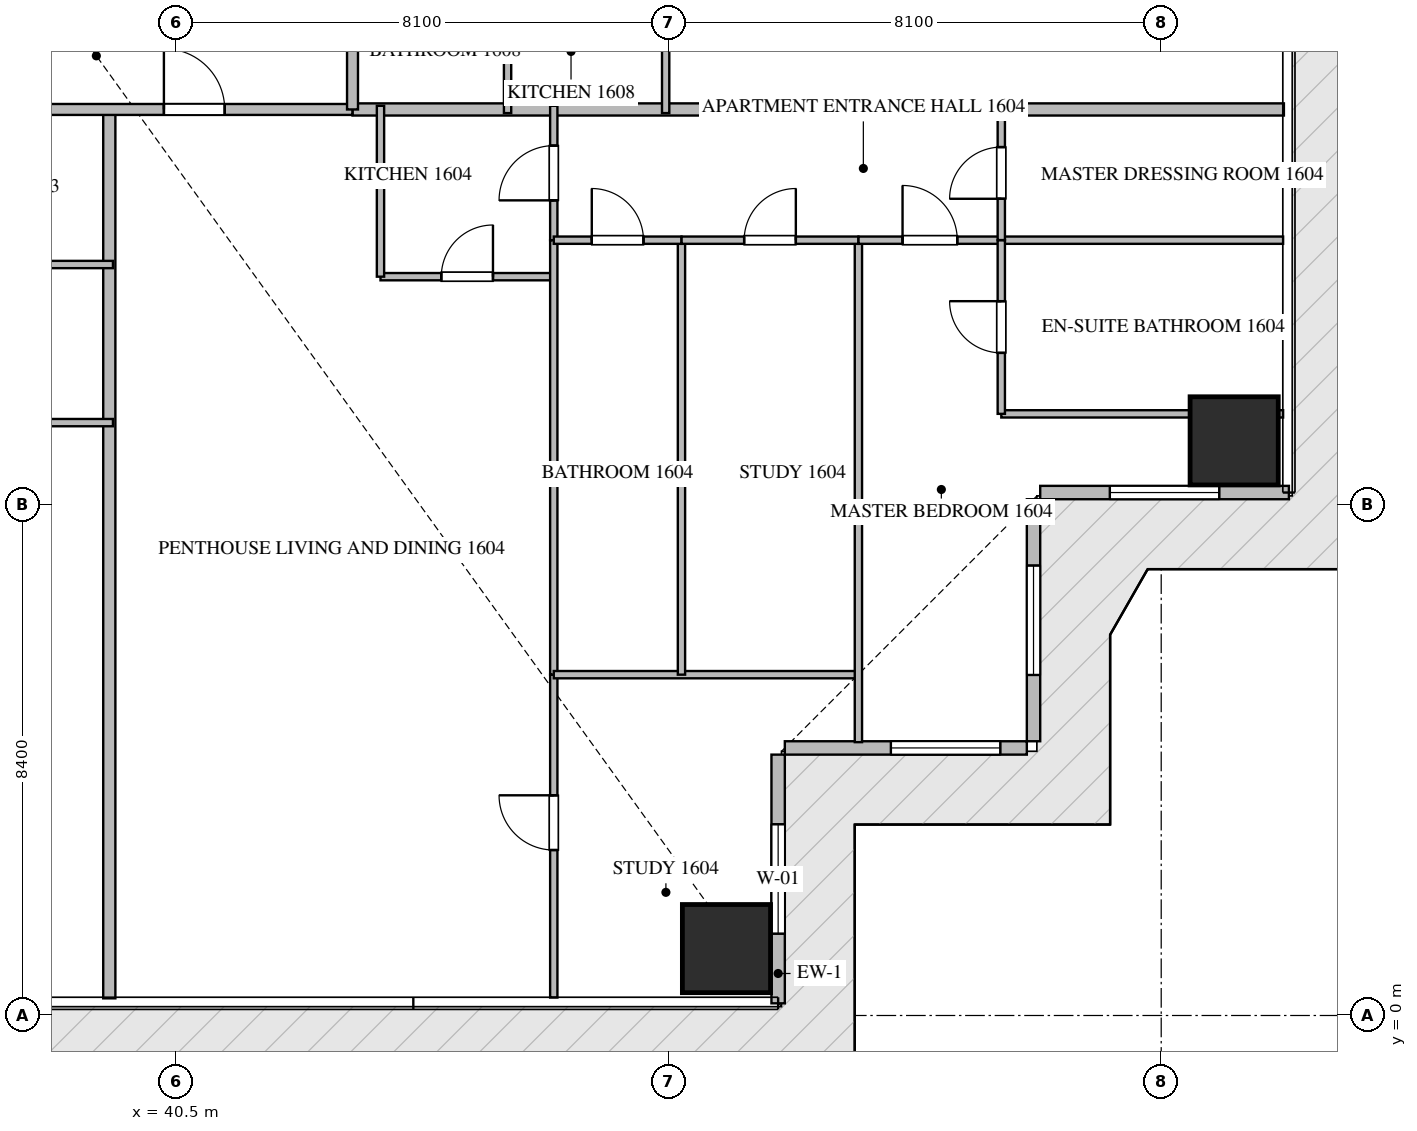
"""IFC4 building model, lengths in metres.
Left out: names, types, materials, properties, quantities, classifications, styles, units other than length and angle.
Written with IfcOpenShell. Run it as: python <this file> out.ifc"""

import sys

from ifc_helpers import new_model, si_unit, direction, frame, frame_2d, origin, origin_2d, place, context, subcontext, project, spatial, rectangle, extrude, source, transform, mapped, element, fill, save


model = new_model("IFC4")
c1 = context("Model", 3, precision=1e-05, world=origin(), true_north=direction((0.0, 1.0)))
c2 = subcontext(c1, "Body", "Model", "MODEL_VIEW")
j1 = project(units=[si_unit("LENGTHUNIT", "METRE"), si_unit("PLANEANGLEUNIT", "RADIAN")], contexts=[c1])
p1 = place(None, origin())
s1 = spatial("IfcSite", under=j1, at=p1, CompositionType="ELEMENT")
p2 = place(p1, origin())
s2 = spatial("IfcBuilding", under=s1, at=p2, CompositionType="ELEMENT")
p3 = place(p2, frame((0.0, 0.0, 67.95)))
s3 = spatial("IfcBuildingStorey", under=s2, at=p3, CompositionType="ELEMENT", Elevation=67.95)
m1 = source(origin(), c2, "Body", "SweptSolid", [
    extrude(rectangle(XDim=1.45, YDim=1.45, at=origin_2d()), origin(), (0.0, 0.0, 1.0), 3.75),
])
for number, where, z_axis, x_axis in (
    (1, (49.55, 1.1, -0.26), (0.0, 0.0, 1.0), (1.0, 0.0, 0.0)),
    (2, (57.9, 9.45, -0.26), (0.0, 0.0, 1.0), (1.0, 0.0, 0.0)),
):
    element("IfcColumn", number, at=place(p3, frame(where, z_axis=z_axis, x_axis=x_axis)), inside=s3, PredefinedType="COLUMN", context=c2, shape_type="MappedRepresentation", body=[
        mapped(m1, transform((0.0, 0.0, 0.0), scale=1.0)),
    ])
p4 = place(p3, frame((50.4, 0.2, 0.0), z_axis=(0.0, 0.0, 1.0), x_axis=(0.0, 1.0, 0.0)))
e3 = element("IfcWall", 3, at=p4, inside=s3, PredefinedType="ELEMENTEDWALL", context=c2, shape_type="SweptSolid", body=[
    extrude(rectangle(XDim=4.09, YDim=0.22, at=frame_2d((2.045, 0.0))), origin(), (0.0, 0.0, 1.0), 3.475),
])
p5 = place(p4, frame((1.145, 0.0, 0.65)))
e4 = element("IfcOpeningElement", 4, at=p5, cuts=e3, PredefinedType="OPENING", context=c2, shape_type="SweptSolid", body=[
    extrude(rectangle(XDim=1.8, YDim=2.1, at=frame_2d((0.9, 1.05))), frame((0.0, 0.12, 0.0), z_axis=(0.0, -1.0, 0.0), x_axis=(1.0, 0.0, 0.0)), (0.0, 0.0, 1.0), 0.24),
])
p6 = place(p3, frame((50.51, 4.4, 0.0), z_axis=(0.0, 0.0, 1.0), x_axis=(1.0, 0.0, 0.0)))
e5 = element("IfcWall", 5, at=p6, inside=s3, PredefinedType="ELEMENTEDWALL", context=c2, shape_type="SweptSolid", body=[
    extrude(rectangle(XDim=3.98, YDim=0.22, at=frame_2d((1.99, 0.0))), origin(), (0.0, 0.0, 1.0), 3.475),
])
p7 = place(p6, frame((1.744, 0.0, 0.65)))
e6 = element("IfcOpeningElement", 6, at=p7, cuts=e5, PredefinedType="OPENING", context=c2, shape_type="SweptSolid", body=[
    extrude(rectangle(XDim=1.8, YDim=2.1, at=frame_2d((0.9, 1.05))), frame((0.0, 0.12, 0.0), z_axis=(0.0, -1.0, 0.0), x_axis=(1.0, 0.0, 0.0)), (0.0, 0.0, 1.0), 0.24),
])
p8 = place(p3, frame((54.6, 4.51, 0.0), z_axis=(0.0, 0.0, 1.0), x_axis=(0.0, 1.0, 0.0)))
e7 = element("IfcWall", 7, at=p8, inside=s3, PredefinedType="ELEMENTEDWALL", context=c2, shape_type="SweptSolid", body=[
    extrude(rectangle(XDim=3.98, YDim=0.22, at=frame_2d((1.99, 0.0))), origin(), (0.0, 0.0, 1.0), 3.475),
])
p9 = place(p8, frame((1.09, 0.0, 0.65)))
e8 = element("IfcOpeningElement", 8, at=p9, cuts=e7, PredefinedType="OPENING", context=c2, shape_type="SweptSolid", body=[
    extrude(rectangle(XDim=1.8, YDim=2.1, at=frame_2d((0.9, 1.05))), frame((0.0, 0.12, 0.0), z_axis=(0.0, -1.0, 0.0), x_axis=(1.0, 0.0, 0.0)), (0.0, 0.0, 1.0), 0.24),
])
p10 = place(p3, frame((54.71, 8.6, 0.0), z_axis=(0.0, 0.0, 1.0), x_axis=(1.0, 0.0, 0.0)))
e9 = element("IfcWall", 9, at=p10, inside=s3, PredefinedType="ELEMENTEDWALL", context=c2, shape_type="SweptSolid", body=[
    extrude(rectangle(XDim=4.09, YDim=0.22, at=frame_2d((2.045, 0.0))), origin(), (0.0, 0.0, 1.0), 3.475),
])
p11 = place(p10, frame((1.145, 0.0, 0.65)))
e10 = element("IfcOpeningElement", 10, at=p11, cuts=e9, PredefinedType="OPENING", context=c2, shape_type="SweptSolid", body=[
    extrude(rectangle(XDim=1.8, YDim=2.1, at=frame_2d((0.9, 1.05))), frame((0.0, 0.12, 0.0), z_axis=(0.0, -1.0, 0.0), x_axis=(1.0, 0.0, 0.0)), (0.0, 0.0, 1.0), 0.24),
])
p12 = place(p3, frame((39.4, 0.282, 0.0), z_axis=(0.0, 0.0, 1.0), x_axis=(0.0, 1.0, 0.0)))
e11 = element("IfcWall", 11, at=p12, inside=s3, PredefinedType="PARTITIONING", context=c2, shape_type="SweptSolid", body=[
    extrude(rectangle(XDim=14.618, YDim=0.2, at=frame_2d((7.309, 0.0))), origin(), (0.0, 0.0, 1.0), 3.49),
])
p13 = place(p3, frame((43.4, 14.9, 0.0), z_axis=(0.0, 0.0, 1.0), x_axis=(1.0, 0.0, 0.0)))
e12 = element("IfcWall", 12, at=p13, inside=s3, PredefinedType="PARTITIONING", context=c2, shape_type="SweptSolid", body=[
    extrude(rectangle(XDim=15.318, YDim=0.2, at=frame_2d((7.659, 0.0))), origin(), (0.0, 0.0, 1.0), 3.49),
])
p14 = place(p3, frame((21.402, 14.9, 0.0), z_axis=(0.0, 0.0, 1.0), x_axis=(1.0, 0.0, 0.0)))
e13 = element("IfcWall", 13, at=p14, inside=s3, PredefinedType="PARTITIONING", context=c2, shape_type="SweptSolid", body=[
    extrude(rectangle(XDim=21.996, YDim=0.18, at=frame_2d((10.998, 0.0))), origin(), (0.0, 0.0, 1.0), 3.49),
])
p15 = place(p14, frame((1.96, 0.0, 0.0)))
e14 = element("IfcOpeningElement", 14, at=p15, cuts=e13, PredefinedType="OPENING", context=c2, shape_type="SweptSolid", body=[
    extrude(rectangle(XDim=1.0, YDim=2.15, at=frame_2d((0.5, 1.075))), frame((0.0, 0.1, 0.0), z_axis=(0.0, -1.0, 0.0), x_axis=(1.0, 0.0, 0.0)), (0.0, 0.0, 1.0), 0.2),
])
p16 = place(p14, frame((5.249, 0.0, 0.0)))
e15 = element("IfcOpeningElement", 15, at=p16, cuts=e13, PredefinedType="OPENING", context=c2, shape_type="SweptSolid", body=[
    extrude(rectangle(XDim=1.0, YDim=2.15, at=frame_2d((0.5, 1.075))), frame((0.0, 0.1, 0.0), z_axis=(0.0, -1.0, 0.0), x_axis=(1.0, 0.0, 0.0)), (0.0, 0.0, 1.0), 0.2),
])
p17 = place(p14, frame((11.653, 0.0, 0.0)))
e16 = element("IfcOpeningElement", 16, at=p17, cuts=e13, PredefinedType="OPENING", context=c2, shape_type="SweptSolid", body=[
    extrude(rectangle(XDim=1.0, YDim=2.15, at=frame_2d((0.5, 1.075))), frame((0.0, 0.1, 0.0), z_axis=(0.0, -1.0, 0.0), x_axis=(1.0, 0.0, 0.0)), (0.0, 0.0, 1.0), 0.2),
])
p18 = place(p14, frame((18.896, 0.0, 0.0)))
e17 = element("IfcOpeningElement", 17, at=p18, cuts=e13, PredefinedType="OPENING", context=c2, shape_type="SweptSolid", body=[
    extrude(rectangle(XDim=1.0, YDim=2.15, at=frame_2d((0.5, 1.075))), frame((0.0, 0.1, 0.0), z_axis=(0.0, -1.0, 0.0), x_axis=(1.0, 0.0, 0.0)), (0.0, 0.0, 1.0), 0.2),
])
p19 = place(p3, frame((43.4, 14.9, 0.0), z_axis=(0.0, 0.0, 1.0), x_axis=(0.0, 1.0, 0.0)))
e18 = element("IfcWall", 18, at=p19, inside=s3, PredefinedType="PARTITIONING", context=c2, shape_type="SweptSolid", body=[
    extrude(rectangle(XDim=20.6, YDim=0.18, at=frame_2d((10.3, 0.0))), origin(), (0.0, 0.0, 1.0), 3.49),
])
p20 = place(p19, frame((3.469, 0.0, 0.0)))
e19 = element("IfcOpeningElement", 19, at=p20, cuts=e18, PredefinedType="OPENING", context=c2, shape_type="SweptSolid", body=[
    extrude(rectangle(XDim=1.0, YDim=2.15, at=frame_2d((0.5, 1.075))), frame((0.0, 0.1, 0.0), z_axis=(0.0, -1.0, 0.0), x_axis=(1.0, 0.0, 0.0)), (0.0, 0.0, 1.0), 0.2),
])
p21 = place(p19, frame((11.074, 0.0, 0.0)))
e20 = element("IfcOpeningElement", 20, at=p21, cuts=e18, PredefinedType="OPENING", context=c2, shape_type="SweptSolid", body=[
    extrude(rectangle(XDim=1.0, YDim=2.15, at=frame_2d((0.5, 1.075))), frame((0.0, 0.1, 0.0), z_axis=(0.0, -1.0, 0.0), x_axis=(1.0, 0.0, 0.0)), (0.0, 0.0, 1.0), 0.2),
])
p22 = place(p19, frame((17.78, 0.0, 0.0)))
e21 = element("IfcOpeningElement", 21, at=p22, cuts=e18, PredefinedType="OPENING", context=c2, shape_type="SweptSolid", body=[
    extrude(rectangle(XDim=1.0, YDim=2.15, at=frame_2d((0.5, 1.075))), frame((0.0, 0.1, 0.0), z_axis=(0.0, -1.0, 0.0), x_axis=(1.0, 0.0, 0.0)), (0.0, 0.0, 1.0), 0.2),
])
for number, where, z_axis, x_axis in (
    (22, (35.3, 12.35, 0.0), (0.0, 0.0, 1.0), (1.0, 0.0, 0.0)),
    (23, (35.3, 9.75, 0.0), (0.0, 0.0, 1.0), (1.0, 0.0, 0.0)),
):
    element("IfcWall", number, at=place(p3, frame(where, z_axis=z_axis, x_axis=x_axis)), inside=s3, PredefinedType="PARTITIONING", context=c2, shape_type="SweptSolid", body=[
        extrude(rectangle(XDim=4.16, YDim=0.12, at=frame_2d((2.08, 0.0))), origin(), (0.0, 0.0, 1.0), 3.49),
    ])
p23 = place(p3, frame((43.86, 12.15, 0.0), z_axis=(0.0, 0.0, 1.0), x_axis=(1.0, 0.0, 0.0)))
e24 = element("IfcWall", 24, at=p23, inside=s3, PredefinedType="PARTITIONING", context=c2, shape_type="SweptSolid", body=[
    extrude(rectangle(XDim=2.85, YDim=0.12, at=frame_2d((1.425, 0.0))), origin(), (0.0, 0.0, 1.0), 3.49),
])
p24 = place(p23, frame((1.0, 0.0, 0.0)))
e25 = element("IfcOpeningElement", 25, at=p24, cuts=e24, PredefinedType="OPENING", context=c2, shape_type="SweptSolid", body=[
    extrude(rectangle(XDim=0.85, YDim=2.1, at=frame_2d((0.425, 1.05))), frame((0.0, 0.07, 0.0), z_axis=(0.0, -1.0, 0.0), x_axis=(1.0, 0.0, 0.0)), (0.0, 0.0, 1.0), 0.14),
])
p25 = place(p3, frame((43.86, 12.15, 0.0), z_axis=(0.0, 0.0, 1.0), x_axis=(0.0, 1.0, 0.0)))
e26 = element("IfcWall", 26, at=p25, inside=s3, PredefinedType="PARTITIONING", context=c2, shape_type="SweptSolid", body=[
    extrude(rectangle(XDim=2.81, YDim=0.12, at=frame_2d((1.405, 0.0))), origin(), (0.0, 0.0, 1.0), 3.49),
])
p26 = place(p3, frame((46.71, 12.75, 0.0), z_axis=(0.0, 0.0, 1.0), x_axis=(0.0, 1.0, 0.0)))
e27 = element("IfcWall", 27, at=p26, inside=s3, PredefinedType="PARTITIONING", context=c2, shape_type="SweptSolid", body=[
    extrude(rectangle(XDim=2.21, YDim=0.12, at=frame_2d((1.105, 0.0))), origin(), (0.0, 0.0, 1.0), 3.49),
])
p27 = place(p26, frame((0.655, 0.0, 0.0)))
e28 = element("IfcOpeningElement", 28, at=p27, cuts=e27, PredefinedType="OPENING", context=c2, shape_type="SweptSolid", body=[
    extrude(rectangle(XDim=0.9, YDim=2.1, at=frame_2d((0.45, 1.05))), frame((0.0, 0.07, 0.0), z_axis=(0.0, -1.0, 0.0), x_axis=(1.0, 0.0, 0.0)), (0.0, 0.0, 1.0), 0.14),
])
p28 = place(p3, frame((46.71, 0.295, 0.0), z_axis=(0.0, 0.0, 1.0), x_axis=(0.0, 1.0, 0.0)))
e29 = element("IfcWall", 29, at=p28, inside=s3, PredefinedType="PARTITIONING", context=c2, shape_type="SweptSolid", body=[
    extrude(rectangle(XDim=5.31, YDim=0.12, at=frame_2d((2.655, 0.0))), origin(), (0.0, 0.0, 1.0), 3.49),
])
p29 = place(p28, frame((2.426, 0.0, 0.0)))
e30 = element("IfcOpeningElement", 30, at=p29, cuts=e29, PredefinedType="OPENING", context=c2, shape_type="SweptSolid", body=[
    extrude(rectangle(XDim=0.9, YDim=2.1, at=frame_2d((0.45, 1.05))), frame((0.0, 0.07, 0.0), z_axis=(0.0, -1.0, 0.0), x_axis=(1.0, 0.0, 0.0)), (0.0, 0.0, 1.0), 0.14),
])
p30 = place(p3, frame((46.71, 5.607, 0.0), z_axis=(0.0, 0.0, 1.0), x_axis=(0.0, 1.0, 0.0)))
e31 = element("IfcWall", 31, at=p30, inside=s3, PredefinedType="PARTITIONING", context=c2, shape_type="SweptSolid", body=[
    extrude(rectangle(XDim=7.141, YDim=0.12, at=frame_2d((3.571, 0.0))), origin(), (0.0, 0.0, 1.0), 3.49),
])
p31 = place(p3, frame((46.71, 5.605, 0.0), z_axis=(0.0, 0.0, 1.0), x_axis=(1.0, 0.0, 0.0)))
e32 = element("IfcWall", 32, at=p31, inside=s3, PredefinedType="PARTITIONING", context=c2, shape_type="SweptSolid", body=[
    extrude(rectangle(XDim=5.01, YDim=0.12, at=frame_2d((2.505, 0.0))), origin(), (0.0, 0.0, 1.0), 3.49),
])
p32 = place(p3, frame((51.72, 4.495, 0.0), z_axis=(0.0, 0.0, 1.0), x_axis=(0.0, 1.0, 0.0)))
e33 = element("IfcWall", 33, at=p32, inside=s3, PredefinedType="PARTITIONING", context=c2, shape_type="SweptSolid", body=[
    extrude(rectangle(XDim=8.255, YDim=0.12, at=frame_2d((4.127, 0.0))), origin(), (0.0, 0.0, 1.0), 3.49),
])
p33 = place(p3, frame((48.81, 5.605, 0.0), z_axis=(0.0, 0.0, 1.0), x_axis=(0.0, 1.0, 0.0)))
e34 = element("IfcWall", 34, at=p33, inside=s3, PredefinedType="PARTITIONING", context=c2, shape_type="SweptSolid", body=[
    extrude(rectangle(XDim=7.145, YDim=0.12, at=frame_2d((3.573, 0.0))), origin(), (0.0, 0.0, 1.0), 3.49),
])
p34 = place(p3, frame((46.71, 12.75, 0.0), z_axis=(0.0, 0.0, 1.0), x_axis=(1.0, 0.0, 0.0)))
e35 = element("IfcWall", 35, at=p34, inside=s3, PredefinedType="PARTITIONING", context=c2, shape_type="SweptSolid", body=[
    extrude(rectangle(XDim=2.1, YDim=0.12, at=frame_2d((1.05, 0.0))), origin(), (0.0, 0.0, 1.0), 3.49),
])
p35 = place(p34, frame((0.625, 0.0, 0.0)))
e36 = element("IfcOpeningElement", 36, at=p35, cuts=e35, PredefinedType="OPENING", context=c2, shape_type="SweptSolid", body=[
    extrude(rectangle(XDim=0.85, YDim=2.1, at=frame_2d((0.425, 1.05))), frame((0.0, 0.07, 0.0), z_axis=(0.0, -1.0, 0.0), x_axis=(1.0, 0.0, 0.0)), (0.0, 0.0, 1.0), 0.14),
])
p36 = place(p3, frame((48.812, 12.75, 0.0), z_axis=(0.0, 0.0, 1.0), x_axis=(1.0, 0.0, 0.0)))
e37 = element("IfcWall", 37, at=p36, inside=s3, PredefinedType="PARTITIONING", context=c2, shape_type="SweptSolid", body=[
    extrude(rectangle(XDim=2.908, YDim=0.12, at=frame_2d((1.454, 0.0))), origin(), (0.0, 0.0, 1.0), 3.49),
])
p37 = place(p36, frame((1.029, 0.0, 0.0)))
e38 = element("IfcOpeningElement", 38, at=p37, cuts=e37, PredefinedType="OPENING", context=c2, shape_type="SweptSolid", body=[
    extrude(rectangle(XDim=0.85, YDim=2.1, at=frame_2d((0.425, 1.05))), frame((0.0, 0.07, 0.0), z_axis=(0.0, -1.0, 0.0), x_axis=(1.0, 0.0, 0.0)), (0.0, 0.0, 1.0), 0.14),
])
p38 = place(p3, frame((51.722, 12.75, 0.0), z_axis=(0.0, 0.0, 1.0), x_axis=(1.0, 0.0, 0.0)))
e39 = element("IfcWall", 39, at=p38, inside=s3, PredefinedType="PARTITIONING", context=c2, shape_type="SweptSolid", body=[
    extrude(rectangle(XDim=2.348, YDim=0.12, at=frame_2d((1.174, 0.0))), origin(), (0.0, 0.0, 1.0), 3.49),
])
p39 = place(p38, frame((0.724, 0.0, 0.0)))
e40 = element("IfcOpeningElement", 40, at=p39, cuts=e39, PredefinedType="OPENING", context=c2, shape_type="SweptSolid", body=[
    extrude(rectangle(XDim=0.9, YDim=2.1, at=frame_2d((0.45, 1.05))), frame((0.0, 0.07, 0.0), z_axis=(0.0, -1.0, 0.0), x_axis=(1.0, 0.0, 0.0)), (0.0, 0.0, 1.0), 0.14),
])
p40 = place(p3, frame((54.07, 9.894, 0.0), z_axis=(0.0, 0.0, 1.0), x_axis=(1.0, 0.0, 0.0)))
e41 = element("IfcWall", 41, at=p40, inside=s3, PredefinedType="PARTITIONING", context=c2, shape_type="SweptSolid", body=[
    extrude(rectangle(XDim=4.635, YDim=0.12, at=frame_2d((2.317, 0.0))), origin(), (0.0, 0.0, 1.0), 3.49),
])
p41 = place(p3, frame((54.072, 12.75, 0.0), z_axis=(0.0, 0.0, 1.0), x_axis=(1.0, 0.0, 0.0)))
e42 = element("IfcWall", 42, at=p41, inside=s3, PredefinedType="PARTITIONING", context=c2, shape_type="SweptSolid", body=[
    extrude(rectangle(XDim=4.633, YDim=0.12, at=frame_2d((2.316, 0.0))), origin(), (0.0, 0.0, 1.0), 3.49),
])
p42 = place(p3, frame((54.07, 9.894, 0.0), z_axis=(0.0, 0.0, 1.0), x_axis=(0.0, 1.0, 0.0)))
e43 = element("IfcWall", 43, at=p42, inside=s3, PredefinedType="PARTITIONING", context=c2, shape_type="SweptSolid", body=[
    extrude(rectangle(XDim=2.856, YDim=0.12, at=frame_2d((1.428, 0.0))), origin(), (0.0, 0.0, 1.0), 3.49),
])
p43 = place(p42, frame((1.003, 0.0, 0.0)))
e44 = element("IfcOpeningElement", 44, at=p43, cuts=e43, PredefinedType="OPENING", context=c2, shape_type="SweptSolid", body=[
    extrude(rectangle(XDim=0.85, YDim=2.1, at=frame_2d((0.425, 1.05))), frame((0.0, 0.07, 0.0), z_axis=(0.0, -1.0, 0.0), x_axis=(1.0, 0.0, 0.0)), (0.0, 0.0, 1.0), 0.14),
])
p44 = place(p3, frame((54.07, 12.752, 0.0), z_axis=(0.0, 0.0, 1.0), x_axis=(0.0, 1.0, 0.0)))
e45 = element("IfcWall", 45, at=p44, inside=s3, PredefinedType="PARTITIONING", context=c2, shape_type="SweptSolid", body=[
    extrude(rectangle(XDim=2.208, YDim=0.12, at=frame_2d((1.104, 0.0))), origin(), (0.0, 0.0, 1.0), 3.49),
])
p45 = place(p44, frame((0.679, 0.0, 0.0)))
e46 = element("IfcOpeningElement", 46, at=p45, cuts=e45, PredefinedType="OPENING", context=c2, shape_type="SweptSolid", body=[
    extrude(rectangle(XDim=0.85, YDim=2.1, at=frame_2d((0.425, 1.05))), frame((0.0, 0.07, 0.0), z_axis=(0.0, -1.0, 0.0), x_axis=(1.0, 0.0, 0.0)), (0.0, 0.0, 1.0), 0.14),
])
for number, where, z_axis, x_axis in (
    (47, (45.95, 14.84, 0.0), (0.0, 0.0, 1.0), (0.0, 1.0, 0.0)),
    (48, (48.55, 14.84, 0.0), (0.0, 0.0, 1.0), (0.0, 1.0, 0.0)),
):
    element("IfcWall", number, at=place(p3, frame(where, z_axis=z_axis, x_axis=x_axis)), inside=s3, PredefinedType="PARTITIONING", context=c2, shape_type="SweptSolid", body=[
        extrude(rectangle(XDim=2.48, YDim=0.12, at=frame_2d((1.24, 0.0))), origin(), (0.0, 0.0, 1.0), 3.49),
    ])
m2 = source(origin(), c2, "Body", "SweptSolid", [
    extrude(rectangle(XDim=1.8, YDim=2.1, at=frame_2d((0.9, 1.05))), frame((0.0, 0.03, 0.0), z_axis=(0.0, -1.0, 0.0), x_axis=(1.0, 0.0, 0.0)), (0.0, 0.0, 1.0), 0.06),
])
p46 = place(p5, origin())
e49 = element("IfcWindow", 49, at=p46, inside=s3, PartitioningType="SINGLE_PANEL", PredefinedType="WINDOW", context=c2, shape_type="MappedRepresentation", body=[
    mapped(m2, transform((0.0, 0.0, 0.0), scale=1.0)),
])
fill(e4, e49)
p47 = place(p7, origin())
e50 = element("IfcWindow", 50, at=p47, inside=s3, PartitioningType="SINGLE_PANEL", PredefinedType="WINDOW", context=c2, shape_type="MappedRepresentation", body=[
    mapped(m2, transform((0.0, 0.0, 0.0), scale=1.0)),
])
fill(e6, e50)
p48 = place(p9, origin())
e51 = element("IfcWindow", 51, at=p48, inside=s3, PartitioningType="SINGLE_PANEL", PredefinedType="WINDOW", context=c2, shape_type="MappedRepresentation", body=[
    mapped(m2, transform((0.0, 0.0, 0.0), scale=1.0)),
])
fill(e8, e51)
p49 = place(p11, origin())
e52 = element("IfcWindow", 52, at=p49, inside=s3, PartitioningType="SINGLE_PANEL", PredefinedType="WINDOW", context=c2, shape_type="MappedRepresentation", body=[
    mapped(m2, transform((0.0, 0.0, 0.0), scale=1.0)),
])
fill(e10, e52)
m3 = source(origin(), c2, "Body", "SweptSolid", [
    extrude(rectangle(XDim=1.0, YDim=2.15, at=frame_2d((0.5, 1.075))), frame((0.0, 0.025, 0.0), z_axis=(0.0, -1.0, 0.0), x_axis=(1.0, 0.0, 0.0)), (0.0, 0.0, 1.0), 0.05),
])
p50 = place(p18, origin())
e53 = element("IfcDoor", 53, at=p50, inside=s3, OperationType="SINGLE_SWING_LEFT", PredefinedType="DOOR", context=c2, shape_type="MappedRepresentation", body=[
    mapped(m3, transform((0.0, 0.0, 0.0), scale=1.0)),
])
fill(e17, e53)
m4 = source(origin(), c2, "Body", "SweptSolid", [
    extrude(rectangle(XDim=0.85, YDim=2.1, at=frame_2d((0.425, 1.05))), frame((0.0, 0.025, 0.0), z_axis=(0.0, -1.0, 0.0), x_axis=(1.0, 0.0, 0.0)), (0.0, 0.0, 1.0), 0.05),
])
p51 = place(p24, origin())
e54 = element("IfcDoor", 54, at=p51, inside=s3, OperationType="SINGLE_SWING_RIGHT", PredefinedType="DOOR", context=c2, shape_type="MappedRepresentation", body=[
    mapped(m4, transform((0.0, 0.0, 0.0), scale=1.0)),
])
fill(e25, e54)
m5 = source(origin(), c2, "Body", "SweptSolid", [
    extrude(rectangle(XDim=0.9, YDim=2.1, at=frame_2d((0.45, 1.05))), frame((0.0, 0.025, 0.0), z_axis=(0.0, -1.0, 0.0), x_axis=(1.0, 0.0, 0.0)), (0.0, 0.0, 1.0), 0.05),
])
p52 = place(p27, origin())
e55 = element("IfcDoor", 55, at=p52, inside=s3, OperationType="SINGLE_SWING_LEFT", PredefinedType="DOOR", context=c2, shape_type="MappedRepresentation", body=[
    mapped(m5, transform((0.0, 0.0, 0.0), scale=1.0)),
])
fill(e28, e55)
p53 = place(p29, origin())
e56 = element("IfcDoor", 56, at=p53, inside=s3, OperationType="SINGLE_SWING_RIGHT", PredefinedType="DOOR", context=c2, shape_type="MappedRepresentation", body=[
    mapped(m5, transform((0.0, 0.0, 0.0), scale=1.0)),
])
fill(e30, e56)
p54 = place(p35, origin())
e57 = element("IfcDoor", 57, at=p54, inside=s3, OperationType="SINGLE_SWING_LEFT", PredefinedType="DOOR", context=c2, shape_type="MappedRepresentation", body=[
    mapped(m4, transform((0.0, 0.0, 0.0), scale=1.0)),
])
fill(e36, e57)
p55 = place(p37, origin())
e58 = element("IfcDoor", 58, at=p55, inside=s3, OperationType="SINGLE_SWING_RIGHT", PredefinedType="DOOR", context=c2, shape_type="MappedRepresentation", body=[
    mapped(m4, transform((0.0, 0.0, 0.0), scale=1.0)),
])
fill(e38, e58)
p56 = place(p39, origin())
e59 = element("IfcDoor", 59, at=p56, inside=s3, OperationType="SINGLE_SWING_LEFT", PredefinedType="DOOR", context=c2, shape_type="MappedRepresentation", body=[
    mapped(m5, transform((0.0, 0.0, 0.0), scale=1.0)),
])
fill(e40, e59)
p57 = place(p43, origin())
e60 = element("IfcDoor", 60, at=p57, inside=s3, OperationType="SINGLE_SWING_RIGHT", PredefinedType="DOOR", context=c2, shape_type="MappedRepresentation", body=[
    mapped(m4, transform((0.0, 0.0, 0.0), scale=1.0)),
])
fill(e44, e60)
p58 = place(p45, origin())
e61 = element("IfcDoor", 61, at=p58, inside=s3, OperationType="SINGLE_SWING_LEFT", PredefinedType="DOOR", context=c2, shape_type="MappedRepresentation", body=[
    mapped(m4, transform((0.0, 0.0, 0.0), scale=1.0)),
])
fill(e46, e61)
save(model, sys.argv[1])
